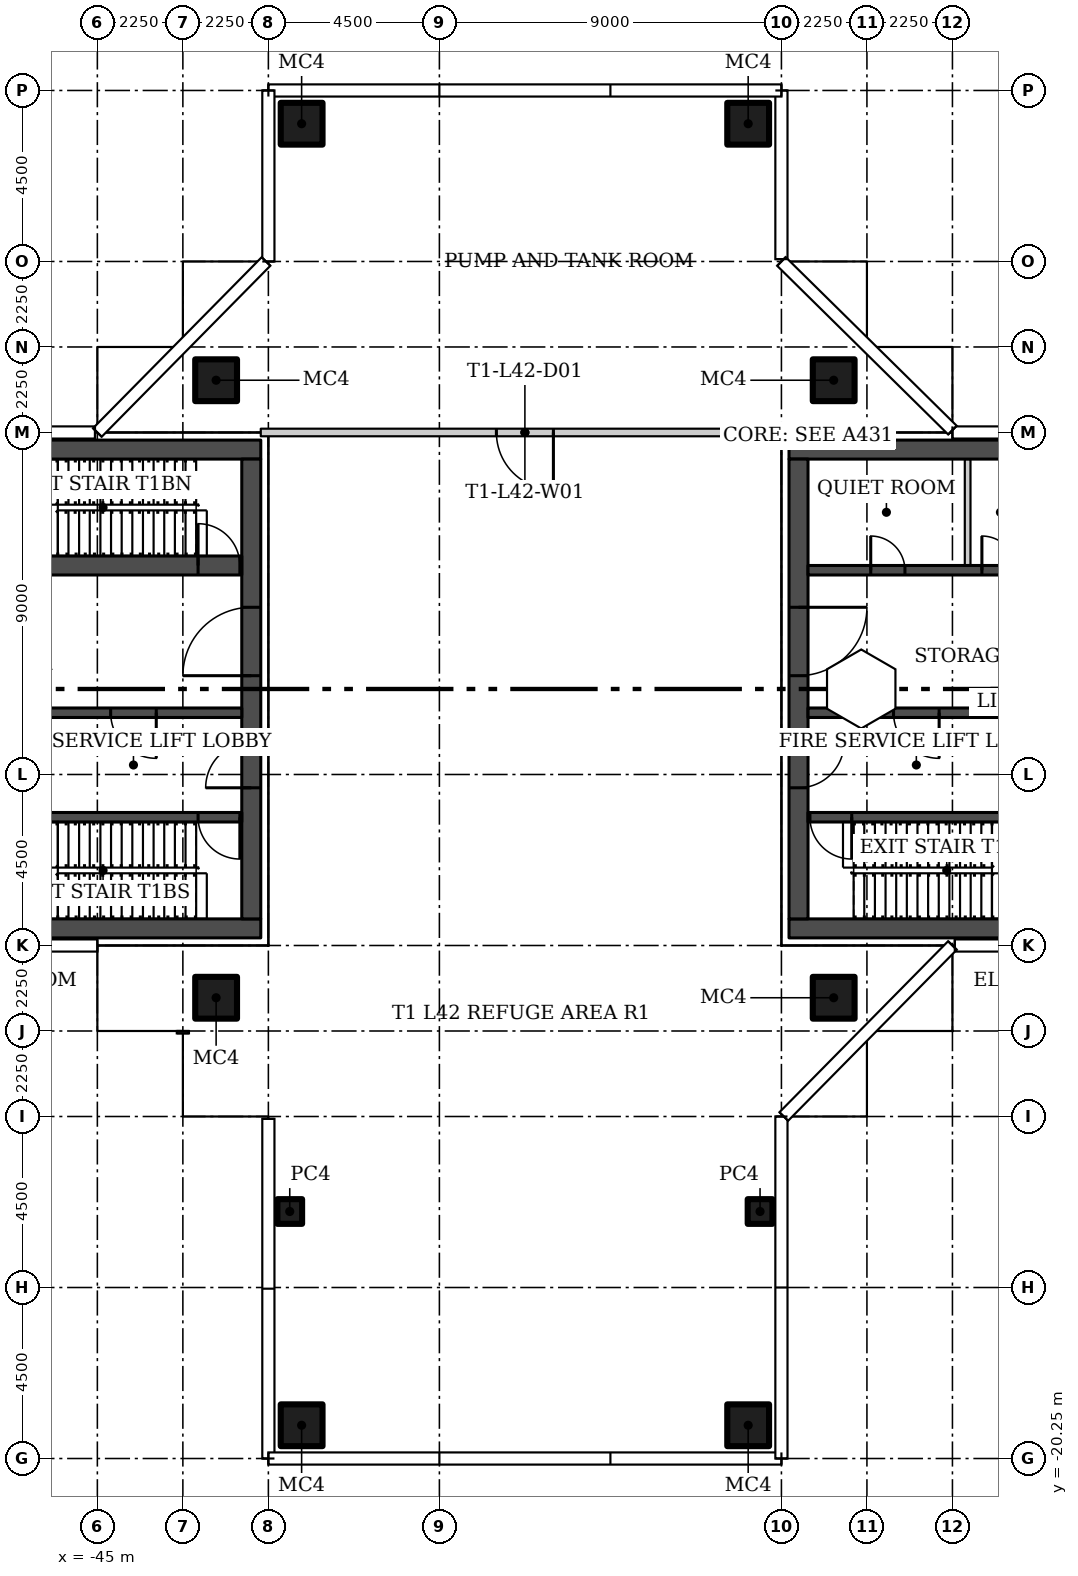
"""IFC4 building model, lengths in metres.
Left out: names, types, materials, properties, quantities, classifications, styles, units other than length and angle.
Written with IfcOpenShell. Run it as: python <this file> out.ifc"""

import sys

from ifc_helpers import new_model, si_unit, direction, frame, frame_2d, origin, origin_2d, place, context, subcontext, project, spatial, rectangle, hollow_rectangle, extrude, element, fill, save


model = new_model("IFC4")
c1 = context("Model", 3, precision=1e-05, world=origin(), true_north=direction((0.0, 1.0)))
c2 = subcontext(c1, "Body", "Model", "MODEL_VIEW")
j1 = project(units=[si_unit("LENGTHUNIT", "METRE"), si_unit("PLANEANGLEUNIT", "RADIAN")], contexts=[c1])
p1 = place(None, origin())
s1 = spatial("IfcSite", under=j1, at=p1, CompositionType="ELEMENT")
p2 = place(p1, origin())
s2 = spatial("IfcBuilding", under=s1, at=p2, CompositionType="ELEMENT")
p3 = place(p2, frame((0.0, 0.0, 177.9)))
s3 = spatial("IfcBuildingStorey", under=s2, at=p3, CompositionType="ELEMENT", Elevation=177.9)
for number, where in (
    (1, (-25.625, 8.125, 0.0)),
    (2, (-25.625, -8.125, 0.0)),
    (3, (-41.875, 8.125, 0.0)),
    (4, (-41.875, -8.125, 0.0)),
    (5, (-39.625, 14.875, 0.0)),
    (6, (-27.875, 14.875, 0.0)),
):
    element("IfcColumn", number, at=place(p3, frame(where)), inside=s3, PredefinedType="COLUMN", context=c2, shape_type="SweptSolid", body=[
        extrude(hollow_rectangle(XDim=1.1, YDim=1.1, WallThickness=0.04, at=origin_2d()), origin(), (0.0, 0.0, 1.0), 4.45),
    ])
p4 = place(p3, frame((-39.938, -13.75, 0.0)))
e7 = element("IfcColumn", 7, at=p4, inside=s3, PredefinedType="COLUMN", context=c2, shape_type="SweptSolid", body=[
    extrude(hollow_rectangle(XDim=0.65, YDim=0.65, WallThickness=0.02, at=origin_2d()), origin(), (0.0, 0.0, 1.0), 4.45),
])
p5 = place(p3, frame((-39.625, -19.375, 0.0)))
e8 = element("IfcColumn", 8, at=p5, inside=s3, PredefinedType="COLUMN", context=c2, shape_type="SweptSolid", body=[
    extrude(hollow_rectangle(XDim=1.1, YDim=1.1, WallThickness=0.04, at=origin_2d()), origin(), (0.0, 0.0, 1.0), 4.45),
])
p6 = place(p3, frame((-27.562, -13.75, 0.0)))
e9 = element("IfcColumn", 9, at=p6, inside=s3, PredefinedType="COLUMN", context=c2, shape_type="SweptSolid", body=[
    extrude(hollow_rectangle(XDim=0.65, YDim=0.65, WallThickness=0.02, at=origin_2d()), origin(), (0.0, 0.0, 1.0), 4.45),
])
p7 = place(p3, frame((-27.875, -19.375, 0.0)))
e10 = element("IfcColumn", 10, at=p7, inside=s3, PredefinedType="COLUMN", context=c2, shape_type="SweptSolid", body=[
    extrude(hollow_rectangle(XDim=1.1, YDim=1.1, WallThickness=0.04, at=origin_2d()), origin(), (0.0, 0.0, 1.0), 4.45),
])
p8 = place(p3, frame((-26.8, 6.75, 0.0), z_axis=(0.0, 0.0, 1.0), x_axis=(-1.0, 0.0, 0.0)))
e11 = element("IfcWall", 11, at=p8, inside=s3, PredefinedType="PARTITIONING", context=c2, shape_type="SweptSolid", body=[
    extrude(rectangle(XDim=13.9, YDim=0.2, at=frame_2d((6.95, 0.0))), origin(), (0.0, 0.0, 1.0), 4.45),
])
p9 = place(p8, frame((6.2, 0.0, 0.0)))
e12 = element("IfcOpeningElement", 12, at=p9, cuts=e11, PredefinedType="OPENING", context=c2, shape_type="SweptSolid", body=[
    extrude(rectangle(XDim=1.5, YDim=2.4, at=frame_2d((0.75, 1.2))), frame((0.0, 0.11, 0.0), z_axis=(0.0, -1.0, 0.0), x_axis=(1.0, 0.0, 0.0)), (0.0, 0.0, 1.0), 0.22),
])
for number, where in (
    (13, (-26.8, -6.3, 0.0)),
    (14, (-26.8, 6.3, 0.0)),
):
    element("IfcWall", number, at=place(p3, frame(where)), inside=s3, PredefinedType="SHEAR", context=c2, shape_type="SweptSolid", body=[
        extrude(rectangle(XDim=13.1, YDim=0.5, at=frame_2d((6.55, 0.0))), origin(), (0.0, 0.0, 1.0), 4.45),
    ])
p10 = place(p3, frame((-26.55, 6.05, 0.0), z_axis=(0.0, 0.0, 1.0), x_axis=(0.0, -1.0, 0.0)))
e15 = element("IfcWall", 15, at=p10, inside=s3, PredefinedType="SHEAR", context=c2, shape_type="SweptSolid", body=[
    extrude(rectangle(XDim=12.1, YDim=0.5, at=frame_2d((6.05, 0.0))), origin(), (0.0, 0.0, 1.0), 4.45),
])
p11 = place(p10, frame((7.45, 0.0, 0.0)))
e16 = element("IfcOpeningElement", 16, at=p11, cuts=e15, PredefinedType="OPENING", context=c2, shape_type="SweptSolid", body=[
    extrude(rectangle(XDim=1.2, YDim=2.1, at=frame_2d((0.6, 1.05))), frame((0.0, 0.26, 0.0), z_axis=(0.0, -1.0, 0.0), x_axis=(1.0, 0.0, 0.0)), (0.0, 0.0, 1.0), 0.52),
])
p12 = place(p10, frame((3.9, 0.0, 0.0)))
e17 = element("IfcOpeningElement", 17, at=p12, cuts=e15, PredefinedType="OPENING", context=c2, shape_type="SweptSolid", body=[
    extrude(rectangle(XDim=1.8, YDim=2.4, at=frame_2d((0.9, 1.2))), frame((0.0, 0.26, 0.0), z_axis=(0.0, -1.0, 0.0), x_axis=(1.0, 0.0, 0.0)), (0.0, 0.0, 1.0), 0.52),
])
p13 = place(p3, frame((-14.2, -3.375, 0.0), z_axis=(0.0, 0.0, 1.0), x_axis=(-1.0, 0.0, 0.0)))
e18 = element("IfcWall", 18, at=p13, inside=s3, PredefinedType="SHEAR", context=c2, shape_type="SweptSolid", body=[
    extrude(rectangle(XDim=12.1, YDim=0.25, at=frame_2d((6.05, 0.0))), origin(), (0.0, 0.0, 1.0), 4.45),
])
p14 = place(p13, frame((10.95, 0.0, 0.0)))
e19 = element("IfcOpeningElement", 19, at=p14, cuts=e18, PredefinedType="OPENING", context=c2, shape_type="SweptSolid", body=[
    extrude(rectangle(XDim=1.1, YDim=2.1, at=frame_2d((0.55, 1.05))), frame((0.0, 0.135, 0.0), z_axis=(0.0, -1.0, 0.0), x_axis=(1.0, 0.0, 0.0)), (0.0, 0.0, 1.0), 0.27),
])
p15 = place(p3, frame((-14.2, -0.625, 0.0), z_axis=(0.0, 0.0, 1.0), x_axis=(-1.0, 0.0, 0.0)))
e20 = element("IfcWall", 20, at=p15, inside=s3, PredefinedType="SHEAR", context=c2, shape_type="SweptSolid", body=[
    extrude(rectangle(XDim=12.1, YDim=0.25, at=frame_2d((6.05, 0.0))), origin(), (0.0, 0.0, 1.0), 4.45),
])
p16 = place(p15, frame((8.65, 0.0, 0.0)))
e21 = element("IfcOpeningElement", 21, at=p16, cuts=e20, PredefinedType="OPENING", context=c2, shape_type="SweptSolid", body=[
    extrude(rectangle(XDim=1.2, YDim=2.1, at=frame_2d((0.6, 1.05))), frame((0.0, 0.135, 0.0), z_axis=(0.0, -1.0, 0.0), x_axis=(1.0, 0.0, 0.0)), (0.0, 0.0, 1.0), 0.27),
])
p17 = place(p15, frame((1.7, 0.0, 0.0)))
e22 = element("IfcOpeningElement", 22, at=p17, cuts=e20, PredefinedType="OPENING", context=c2, shape_type="SweptSolid", body=[
    extrude(rectangle(XDim=0.9, YDim=2.1, at=frame_2d((0.45, 1.05))), frame((0.0, 0.135, 0.0), z_axis=(0.0, -1.0, 0.0), x_axis=(1.0, 0.0, 0.0)), (0.0, 0.0, 1.0), 0.27),
])
p18 = place(p15, frame((0.075, 0.0, 0.0)))
e23 = element("IfcOpeningElement", 23, at=p18, cuts=e20, PredefinedType="OPENING", context=c2, shape_type="SweptSolid", body=[
    extrude(rectangle(XDim=0.9, YDim=2.1, at=frame_2d((0.45, 1.05))), frame((0.0, 0.135, 0.0), z_axis=(0.0, -1.0, 0.0), x_axis=(1.0, 0.0, 0.0)), (0.0, 0.0, 1.0), 0.27),
])
p19 = place(p3, frame((-26.3, 3.125, 0.0)))
e24 = element("IfcWall", 24, at=p19, inside=s3, PredefinedType="SHEAR", context=c2, shape_type="SweptSolid", body=[
    extrude(rectangle(XDim=12.1, YDim=0.25, at=frame_2d((6.05, 0.0))), origin(), (0.0, 0.0, 1.0), 4.45),
])
p20 = place(p19, frame((6.95, 0.0, 0.0)))
e25 = element("IfcOpeningElement", 25, at=p20, cuts=e24, PredefinedType="OPENING", context=c2, shape_type="SweptSolid", body=[
    extrude(rectangle(XDim=1.1, YDim=2.1, at=frame_2d((0.55, 1.05))), frame((0.0, 0.135, 0.0), z_axis=(0.0, -1.0, 0.0), x_axis=(1.0, 0.0, 0.0)), (0.0, 0.0, 1.0), 0.27),
])
p21 = place(p19, frame((10.075, 0.0, 0.0)))
e26 = element("IfcOpeningElement", 26, at=p21, cuts=e24, PredefinedType="OPENING", context=c2, shape_type="SweptSolid", body=[
    extrude(rectangle(XDim=1.1, YDim=2.1, at=frame_2d((0.55, 1.05))), frame((0.0, 0.135, 0.0), z_axis=(0.0, -1.0, 0.0), x_axis=(1.0, 0.0, 0.0)), (0.0, 0.0, 1.0), 0.27),
])
p22 = place(p19, frame((1.65, 0.0, 0.0)))
e27 = element("IfcOpeningElement", 27, at=p22, cuts=e24, PredefinedType="OPENING", context=c2, shape_type="SweptSolid", body=[
    extrude(rectangle(XDim=0.9, YDim=2.1, at=frame_2d((0.45, 1.05))), frame((0.0, 0.135, 0.0), z_axis=(0.0, -1.0, 0.0), x_axis=(1.0, 0.0, 0.0)), (0.0, 0.0, 1.0), 0.27),
])
p23 = place(p19, frame((4.575, 0.0, 0.0)))
e28 = element("IfcOpeningElement", 28, at=p23, cuts=e24, PredefinedType="OPENING", context=c2, shape_type="SweptSolid", body=[
    extrude(rectangle(XDim=0.9, YDim=2.1, at=frame_2d((0.45, 1.05))), frame((0.0, 0.135, 0.0), z_axis=(0.0, -1.0, 0.0), x_axis=(1.0, 0.0, 0.0)), (0.0, 0.0, 1.0), 0.27),
])
p24 = place(p3, frame((-22.1, 3.25, 0.0), z_axis=(0.0, 0.0, 1.0), x_axis=(0.0, 1.0, 0.0)))
e29 = element("IfcWall", 29, at=p24, inside=s3, PredefinedType="PARTITIONING", context=c2, shape_type="SweptSolid", body=[
    extrude(rectangle(XDim=2.8, YDim=0.15, at=frame_2d((1.4, 0.0))), origin(), (0.0, 0.0, 1.0), 4.45),
])
for number, where, z_axis, x_axis in (
    (30, (-40.7, -6.3, 0.0), (0.0, 0.0, 1.0), (-1.0, 0.0, 0.0)),
    (31, (-40.7, 6.3, 0.0), (0.0, 0.0, 1.0), (-1.0, 0.0, 0.0)),
):
    element("IfcWall", number, at=place(p3, frame(where, z_axis=z_axis, x_axis=x_axis)), inside=s3, PredefinedType="SHEAR", context=c2, shape_type="SweptSolid", body=[
        extrude(rectangle(XDim=13.1, YDim=0.5, at=frame_2d((6.55, 0.0))), origin(), (0.0, 0.0, 1.0), 4.45),
    ])
p25 = place(p3, frame((-40.95, -6.05, 0.0), z_axis=(0.0, 0.0, 1.0), x_axis=(0.0, 1.0, 0.0)))
e32 = element("IfcWall", 32, at=p25, inside=s3, PredefinedType="SHEAR", context=c2, shape_type="SweptSolid", body=[
    extrude(rectangle(XDim=12.1, YDim=0.5, at=frame_2d((6.05, 0.0))), origin(), (0.0, 0.0, 1.0), 4.45),
])
p26 = place(p25, frame((3.45, 0.0, 0.0)))
e33 = element("IfcOpeningElement", 33, at=p26, cuts=e32, PredefinedType="OPENING", context=c2, shape_type="SweptSolid", body=[
    extrude(rectangle(XDim=1.2, YDim=2.1, at=frame_2d((0.6, 1.05))), frame((0.0, 0.26, 0.0), z_axis=(0.0, -1.0, 0.0), x_axis=(1.0, 0.0, 0.0)), (0.0, 0.0, 1.0), 0.52),
])
p27 = place(p25, frame((6.4, 0.0, 0.0)))
e34 = element("IfcOpeningElement", 34, at=p27, cuts=e32, PredefinedType="OPENING", context=c2, shape_type="SweptSolid", body=[
    extrude(rectangle(XDim=1.8, YDim=2.4, at=frame_2d((0.9, 1.2))), frame((0.0, 0.26, 0.0), z_axis=(0.0, -1.0, 0.0), x_axis=(1.0, 0.0, 0.0)), (0.0, 0.0, 1.0), 0.52),
])
p28 = place(p3, frame((-41.2, -3.375, 0.0), z_axis=(0.0, 0.0, 1.0), x_axis=(-1.0, 0.0, 0.0)))
e35 = element("IfcWall", 35, at=p28, inside=s3, PredefinedType="SHEAR", context=c2, shape_type="SweptSolid", body=[
    extrude(rectangle(XDim=12.1, YDim=0.25, at=frame_2d((6.05, 0.0))), origin(), (0.0, 0.0, 1.0), 4.45),
])
p29 = place(p28, frame((0.05, 0.0, 0.0)))
e36 = element("IfcOpeningElement", 36, at=p29, cuts=e35, PredefinedType="OPENING", context=c2, shape_type="SweptSolid", body=[
    extrude(rectangle(XDim=1.1, YDim=2.1, at=frame_2d((0.55, 1.05))), frame((0.0, 0.135, 0.0), z_axis=(0.0, -1.0, 0.0), x_axis=(1.0, 0.0, 0.0)), (0.0, 0.0, 1.0), 0.27),
])
p30 = place(p3, frame((-41.2, -0.625, 0.0), z_axis=(0.0, 0.0, 1.0), x_axis=(-1.0, 0.0, 0.0)))
e37 = element("IfcWall", 37, at=p30, inside=s3, PredefinedType="SHEAR", context=c2, shape_type="SweptSolid", body=[
    extrude(rectangle(XDim=12.1, YDim=0.25, at=frame_2d((6.05, 0.0))), origin(), (0.0, 0.0, 1.0), 4.45),
])
p31 = place(p30, frame((2.25, 0.0, 0.0)))
e38 = element("IfcOpeningElement", 38, at=p31, cuts=e37, PredefinedType="OPENING", context=c2, shape_type="SweptSolid", body=[
    extrude(rectangle(XDim=1.2, YDim=2.1, at=frame_2d((0.6, 1.05))), frame((0.0, 0.135, 0.0), z_axis=(0.0, -1.0, 0.0), x_axis=(1.0, 0.0, 0.0)), (0.0, 0.0, 1.0), 0.27),
])
p32 = place(p30, frame((10.025, 0.0, 0.0)))
e39 = element("IfcOpeningElement", 39, at=p32, cuts=e37, PredefinedType="OPENING", context=c2, shape_type="SweptSolid", body=[
    extrude(rectangle(XDim=0.9, YDim=2.1, at=frame_2d((0.45, 1.05))), frame((0.0, 0.135, 0.0), z_axis=(0.0, -1.0, 0.0), x_axis=(1.0, 0.0, 0.0)), (0.0, 0.0, 1.0), 0.27),
])
p33 = place(p3, frame((-48.5, 3.25, 0.0)))
e40 = element("IfcWall", 40, at=p33, inside=s3, PredefinedType="SHEAR", context=c2, shape_type="SweptSolid", body=[
    extrude(rectangle(XDim=7.3, YDim=0.5, at=frame_2d((3.65, 0.0))), origin(), (0.0, 0.0, 1.0), 4.45),
])
p34 = place(p33, frame((6.15, 0.0, 0.0)))
e41 = element("IfcOpeningElement", 41, at=p34, cuts=e40, PredefinedType="OPENING", context=c2, shape_type="SweptSolid", body=[
    extrude(rectangle(XDim=1.1, YDim=2.1, at=frame_2d((0.55, 1.05))), frame((0.0, 0.26, 0.0), z_axis=(0.0, -1.0, 0.0), x_axis=(1.0, 0.0, 0.0)), (0.0, 0.0, 1.0), 0.52),
])
p35 = place(p9, origin())
e42 = element("IfcDoor", 42, at=p35, inside=s3, OperationType="DOUBLE_DOOR_SINGLE_SWING", PredefinedType="DOOR", context=c2, shape_type="SweptSolid", body=[
    extrude(rectangle(XDim=1.5, YDim=2.4, at=frame_2d((0.75, 1.2))), frame((0.0, 0.025, 0.0), z_axis=(0.0, -1.0, 0.0), x_axis=(1.0, 0.0, 0.0)), (0.0, 0.0, 1.0), 0.05),
])
fill(e12, e42)
p36 = place(p11, origin())
e43 = element("IfcDoor", 43, at=p36, inside=s3, OperationType="SINGLE_SWING_RIGHT", PredefinedType="DOOR", context=c2, shape_type="SweptSolid", body=[
    extrude(rectangle(XDim=1.2, YDim=2.1, at=frame_2d((0.6, 1.05))), frame((0.0, 0.025, 0.0), z_axis=(0.0, -1.0, 0.0), x_axis=(1.0, 0.0, 0.0)), (0.0, 0.0, 1.0), 0.05),
])
fill(e16, e43)
p37 = place(p12, origin())
e44 = element("IfcDoor", 44, at=p37, inside=s3, OperationType="DOUBLE_DOOR_SINGLE_SWING", PredefinedType="DOOR", context=c2, shape_type="SweptSolid", body=[
    extrude(rectangle(XDim=1.8, YDim=2.4, at=frame_2d((0.9, 1.2))), frame((0.0, 0.025, 0.0), z_axis=(0.0, -1.0, 0.0), x_axis=(1.0, 0.0, 0.0)), (0.0, 0.0, 1.0), 0.05),
])
fill(e17, e44)
p38 = place(p14, origin())
e45 = element("IfcDoor", 45, at=p38, inside=s3, OperationType="SINGLE_SWING_RIGHT", PredefinedType="DOOR", context=c2, shape_type="SweptSolid", body=[
    extrude(rectangle(XDim=1.1, YDim=2.1, at=frame_2d((0.55, 1.05))), frame((0.0, 0.025, 0.0), z_axis=(0.0, -1.0, 0.0), x_axis=(1.0, 0.0, 0.0)), (0.0, 0.0, 1.0), 0.05),
])
fill(e19, e45)
p39 = place(p16, origin())
e46 = element("IfcDoor", 46, at=p39, inside=s3, OperationType="SINGLE_SWING_RIGHT", PredefinedType="DOOR", context=c2, shape_type="SweptSolid", body=[
    extrude(rectangle(XDim=1.2, YDim=2.1, at=frame_2d((0.6, 1.05))), frame((0.0, 0.025, 0.0), z_axis=(0.0, -1.0, 0.0), x_axis=(1.0, 0.0, 0.0)), (0.0, 0.0, 1.0), 0.05),
])
fill(e21, e46)
p40 = place(p22, origin())
e47 = element("IfcDoor", 47, at=p40, inside=s3, OperationType="SINGLE_SWING_LEFT", PredefinedType="DOOR", context=c2, shape_type="SweptSolid", body=[
    extrude(rectangle(XDim=0.9, YDim=2.1, at=frame_2d((0.45, 1.05))), frame((0.0, 0.025, 0.0), z_axis=(0.0, -1.0, 0.0), x_axis=(1.0, 0.0, 0.0)), (0.0, 0.0, 1.0), 0.05),
])
fill(e27, e47)
p41 = place(p23, origin())
e48 = element("IfcDoor", 48, at=p41, inside=s3, OperationType="SINGLE_SWING_LEFT", PredefinedType="DOOR", context=c2, shape_type="SweptSolid", body=[
    extrude(rectangle(XDim=0.9, YDim=2.1, at=frame_2d((0.45, 1.05))), frame((0.0, 0.025, 0.0), z_axis=(0.0, -1.0, 0.0), x_axis=(1.0, 0.0, 0.0)), (0.0, 0.0, 1.0), 0.05),
])
fill(e28, e48)
p42 = place(p26, origin())
e49 = element("IfcDoor", 49, at=p42, inside=s3, OperationType="SINGLE_SWING_LEFT", PredefinedType="DOOR", context=c2, shape_type="SweptSolid", body=[
    extrude(rectangle(XDim=1.2, YDim=2.1, at=frame_2d((0.6, 1.05))), frame((0.0, 0.025, 0.0), z_axis=(0.0, -1.0, 0.0), x_axis=(1.0, 0.0, 0.0)), (0.0, 0.0, 1.0), 0.05),
])
fill(e33, e49)
p43 = place(p27, origin())
e50 = element("IfcDoor", 50, at=p43, inside=s3, OperationType="DOUBLE_DOOR_SINGLE_SWING", PredefinedType="DOOR", context=c2, shape_type="SweptSolid", body=[
    extrude(rectangle(XDim=1.8, YDim=2.4, at=frame_2d((0.9, 1.2))), frame((0.0, 0.025, 0.0), z_axis=(0.0, -1.0, 0.0), x_axis=(1.0, 0.0, 0.0)), (0.0, 0.0, 1.0), 0.05),
])
fill(e34, e50)
p44 = place(p29, origin())
e51 = element("IfcDoor", 51, at=p44, inside=s3, OperationType="SINGLE_SWING_LEFT", PredefinedType="DOOR", context=c2, shape_type="SweptSolid", body=[
    extrude(rectangle(XDim=1.1, YDim=2.1, at=frame_2d((0.55, 1.05))), frame((0.0, 0.025, 0.0), z_axis=(0.0, -1.0, 0.0), x_axis=(1.0, 0.0, 0.0)), (0.0, 0.0, 1.0), 0.05),
])
fill(e36, e51)
p45 = place(p31, origin())
e52 = element("IfcDoor", 52, at=p45, inside=s3, OperationType="SINGLE_SWING_LEFT", PredefinedType="DOOR", context=c2, shape_type="SweptSolid", body=[
    extrude(rectangle(XDim=1.2, YDim=2.1, at=frame_2d((0.6, 1.05))), frame((0.0, 0.025, 0.0), z_axis=(0.0, -1.0, 0.0), x_axis=(1.0, 0.0, 0.0)), (0.0, 0.0, 1.0), 0.05),
])
fill(e38, e52)
p46 = place(p34, origin())
e53 = element("IfcDoor", 53, at=p46, inside=s3, OperationType="SINGLE_SWING_RIGHT", PredefinedType="DOOR", context=c2, shape_type="SweptSolid", body=[
    extrude(rectangle(XDim=1.1, YDim=2.1, at=frame_2d((0.55, 1.05))), frame((0.0, 0.025, 0.0), z_axis=(0.0, -1.0, 0.0), x_axis=(1.0, 0.0, 0.0)), (0.0, 0.0, 1.0), 0.05),
])
fill(e41, e53)
save(model, sys.argv[1])
